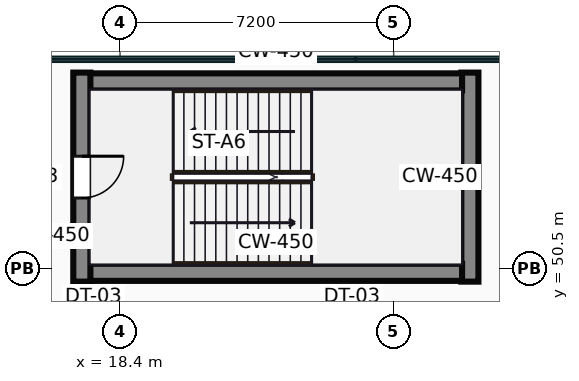
"""IFC4 building model, lengths in metres.
Left out: names, types, materials, properties, quantities, classifications, styles, units other than length and angle.
Written with IfcOpenShell. Run it as: python <this file> out.ifc"""

import sys

from ifc_helpers import new_model, si_unit, direction, frame, frame_2d, origin, place, context, subcontext, project, spatial, rectangle, extrude, source, transform, mapped, element, fill, save


model = new_model("IFC4")
c1 = context("Model", 3, precision=1e-05, world=origin(), true_north=direction((0.0, 1.0)))
c2 = subcontext(c1, "Body", "Model", "MODEL_VIEW")
j1 = project(units=[si_unit("LENGTHUNIT", "METRE"), si_unit("PLANEANGLEUNIT", "RADIAN")], contexts=[c1])
p1 = place(None, origin())
s1 = spatial("IfcSite", under=j1, at=p1, CompositionType="ELEMENT")
p2 = place(p1, origin())
s2 = spatial("IfcBuilding", under=s1, at=p2, CompositionType="ELEMENT")
p3 = place(p2, frame((0.0, 0.0, 6.0)))
s3 = spatial("IfcBuildingStorey", under=s2, at=p3, CompositionType="ELEMENT", Elevation=6.0)
m1 = source(origin(), c2, "Body", "SweptSolid", [
    extrude(rectangle(XDim=5.5, YDim=0.45, at=frame_2d((2.75, 0.0))), origin(), (0.0, 0.0, 1.0), 5.0),
])
p4 = place(p3, frame((17.395, 50.15, 0.0), z_axis=(0.0, 0.0, 1.0), x_axis=(0.0, 1.0, 0.0)))
e1 = element("IfcWall", 1, at=p4, inside=s3, PredefinedType="SHEAR", context=c2, shape_type="MappedRepresentation", body=[
    mapped(m1, transform((0.0, 0.0, 0.0))),
])
p5 = place(p4, frame((2.2, 0.0, 0.0)))
e2 = element("IfcOpeningElement", 2, at=p5, cuts=e1, PredefinedType="OPENING", context=c2, shape_type="SweptSolid", body=[
    extrude(rectangle(XDim=1.1, YDim=2.15, at=frame_2d((0.55, 1.075))), frame((0.0, 0.235, 0.0), z_axis=(0.0, -1.0, 0.0), x_axis=(1.0, 0.0, 0.0)), (0.0, 0.0, 1.0), 0.47),
])
m2 = source(origin(), c2, "Body", "SweptSolid", [
    extrude(rectangle(XDim=9.8, YDim=0.45, at=frame_2d((4.9, 0.0))), origin(), (0.0, 0.0, 1.0), 5.0),
])
for number, where, z_axis, x_axis in (
    (3, (17.6, 50.395, 0.0), (0.0, 0.0, 1.0), (1.0, 0.0, 0.0)),
    (4, (17.6, 55.405, 0.0), (0.0, 0.0, 1.0), (1.0, 0.0, 0.0)),
):
    element("IfcWall", number, at=place(p3, frame(where, z_axis=z_axis, x_axis=x_axis)), inside=s3, PredefinedType="SHEAR", context=c2, shape_type="MappedRepresentation", body=[
        mapped(m2, transform((0.0, 0.0, 0.0))),
    ])
p6 = place(p3, frame((27.605, 50.15, 0.0), z_axis=(0.0, 0.0, 1.0), x_axis=(0.0, 1.0, 0.0)))
e5 = element("IfcWall", 5, at=p6, inside=s3, PredefinedType="SHEAR", context=c2, shape_type="MappedRepresentation", body=[
    mapped(m1, transform((0.0, 0.0, 0.0))),
])
m3 = source(origin(), c2, "Body", "SweptSolid", [
    extrude(rectangle(XDim=1.1, YDim=2.15, at=frame_2d((0.55, 1.075))), frame((0.0, 0.025, 0.0), z_axis=(0.0, -1.0, 0.0), x_axis=(1.0, 0.0, 0.0)), (0.0, 0.0, 1.0), 0.05),
])
p7 = place(p5, frame((1.1, 0.0, 0.0), z_axis=(0.0, 0.0, 1.0), x_axis=(-1.0, 0.0, 0.0)))
e6 = element("IfcDoor", 6, at=p7, inside=s3, OperationType="SINGLE_SWING_RIGHT", PredefinedType="DOOR", context=c2, shape_type="MappedRepresentation", body=[
    mapped(m3, transform((0.0, 0.0, 0.0))),
])
fill(e2, e6)
save(model, sys.argv[1])
